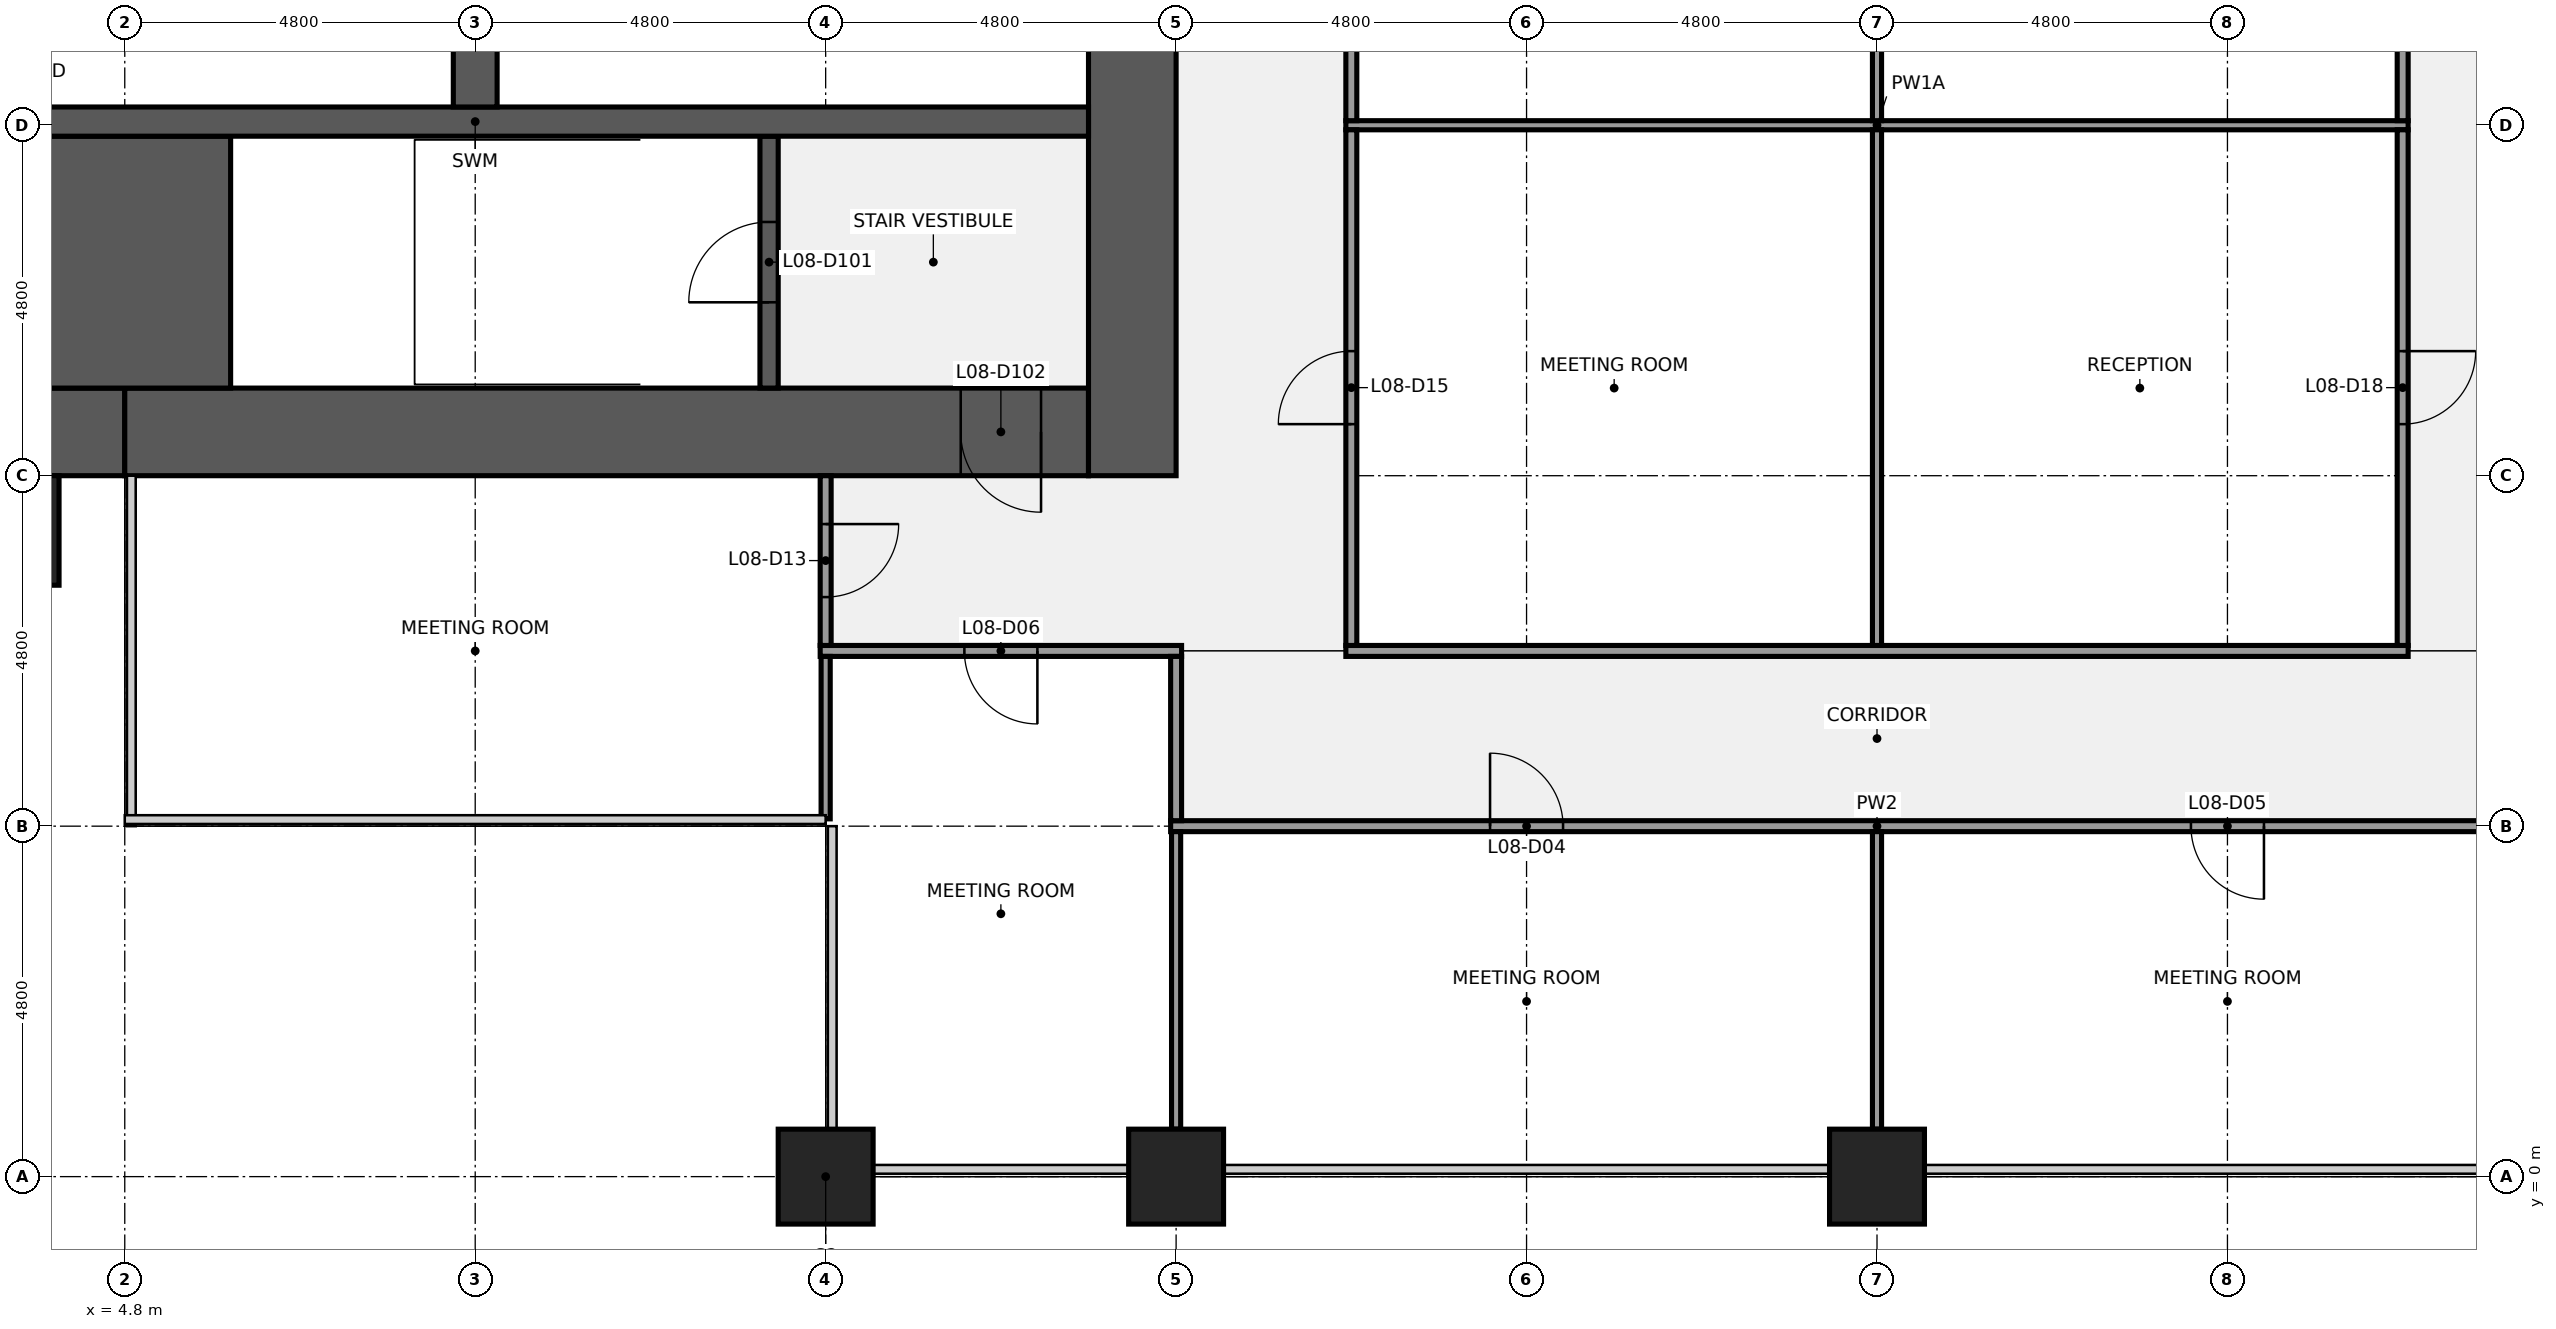
"""IFC4 building model, lengths in metres.
Left out: names, types, materials, properties, quantities, classifications, styles, units other than length and angle.
Written with IfcOpenShell. Run it as: python <this file> out.ifc"""

import sys

from ifc_helpers import new_model, si_unit, direction, frame, frame_2d, origin, origin_2d, place, context, subcontext, project, spatial, rectangle, extrude, element, fill, save


model = new_model("IFC4")
c1 = context("Model", 3, precision=1e-05, world=origin(), true_north=direction((0.0, 1.0)))
c2 = subcontext(c1, "Body", "Model", "MODEL_VIEW")
j1 = project(units=[si_unit("LENGTHUNIT", "METRE"), si_unit("PLANEANGLEUNIT", "RADIAN")], contexts=[c1])
p1 = place(None, origin())
s1 = spatial("IfcSite", under=j1, at=p1, CompositionType="ELEMENT")
p2 = place(p1, origin())
s2 = spatial("IfcBuilding", under=s1, at=p2, CompositionType="ELEMENT")
p3 = place(p2, frame((0.0, 0.0, 43.0)))
s3 = spatial("IfcBuildingStorey", under=s2, at=p3, CompositionType="ELEMENT", Elevation=43.0)
for number, where, z_axis, x_axis in (
    (1, (14.4, 0.0, 0.0), (0.0, 0.0, 1.0), (1.0, 0.0, 0.0)),
    (2, (19.2, 0.0, 0.0), (0.0, 0.0, 1.0), (1.0, 0.0, 0.0)),
    (3, (28.8, 0.0, 0.0), (0.0, 0.0, 1.0), (1.0, 0.0, 0.0)),
):
    element("IfcColumn", number, at=place(p3, frame(where, z_axis=z_axis, x_axis=x_axis)), inside=s3, PredefinedType="COLUMN", context=c2, shape_type="SweptSolid", body=[
        extrude(rectangle(XDim=1.3, YDim=1.3, at=origin_2d()), origin(), (0.0, 0.0, 1.0), 4.0),
    ])
p4 = place(p3, frame((4.8, 10.2, 0.0), z_axis=(0.0, 0.0, 1.0), x_axis=(-1.0, 0.0, 0.0)))
e4 = element("IfcWall", 4, at=p4, inside=s3, PredefinedType="SHEAR", context=c2, shape_type="SweptSolid", body=[
    extrude(rectangle(XDim=3.6, YDim=1.2, at=frame_2d((1.8, 0.0))), origin(), (0.0, 0.0, 1.0), 3.84),
])
p5 = place(p3, frame((18.0, 10.2, 0.0), z_axis=(0.0, 0.0, 1.0), x_axis=(-1.0, 0.0, 0.0)))
e5 = element("IfcWall", 5, at=p5, inside=s3, PredefinedType="SHEAR", context=c2, shape_type="SweptSolid", body=[
    extrude(rectangle(XDim=13.2, YDim=1.2, at=frame_2d((6.6, 0.0))), origin(), (0.0, 0.0, 1.0), 3.84),
])
p6 = place(p5, frame((0.65, 0.0, 0.0)))
e6 = element("IfcOpeningElement", 6, at=p6, cuts=e5, PredefinedType="OPENING", context=c2, shape_type="SweptSolid", body=[
    extrude(rectangle(XDim=1.1, YDim=2.1, at=frame_2d((0.55, 1.05))), frame((0.0, 0.61, 0.0), z_axis=(0.0, -1.0, 0.0), x_axis=(1.0, 0.0, 0.0)), (0.0, 0.0, 1.0), 1.22),
])
p7 = place(p3, frame((18.6, 38.4, 0.0), z_axis=(0.0, 0.0, 1.0), x_axis=(0.0, -1.0, 0.0)))
e7 = element("IfcWall", 7, at=p7, inside=s3, PredefinedType="SHEAR", context=c2, shape_type="SweptSolid", body=[
    extrude(rectangle(XDim=28.8, YDim=1.2, at=frame_2d((14.4, 0.0))), origin(), (0.0, 0.0, 1.0), 3.84),
])
p8 = place(p7, frame((18.3, 0.0, 0.0)))
e8 = element("IfcOpeningElement", 8, at=p8, cuts=e7, PredefinedType="OPENING", context=c2, shape_type="SweptSolid", body=[
    extrude(rectangle(XDim=1.8, YDim=2.1, at=frame_2d((0.9, 1.05))), frame((0.0, 0.61, 0.0), z_axis=(0.0, -1.0, 0.0), x_axis=(1.0, 0.0, 0.0)), (0.0, 0.0, 1.0), 1.22),
])
p9 = place(p7, frame((8.7, 0.0, 0.0)))
e9 = element("IfcOpeningElement", 9, at=p9, cuts=e7, PredefinedType="OPENING", context=c2, shape_type="SweptSolid", body=[
    extrude(rectangle(XDim=1.8, YDim=2.1, at=frame_2d((0.9, 1.05))), frame((0.0, 0.61, 0.0), z_axis=(0.0, -1.0, 0.0), x_axis=(1.0, 0.0, 0.0)), (0.0, 0.0, 1.0), 1.22),
])
p10 = place(p3, frame((1.2, 12.525, 0.0), z_axis=(0.0, 0.0, 1.0), x_axis=(1.0, 0.0, 0.0)))
e10 = element("IfcWall", 10, at=p10, inside=s3, PredefinedType="SHEAR", context=c2, shape_type="SweptSolid", body=[
    extrude(rectangle(XDim=5.05, YDim=3.45, at=frame_2d((2.525, 0.0))), origin(), (0.0, 0.0, 1.0), 3.84),
])
p11 = place(p3, frame((13.625, 10.8, 0.0), z_axis=(0.0, 0.0, 1.0), x_axis=(0.0, 1.0, 0.0)))
e11 = element("IfcWall", 11, at=p11, inside=s3, PredefinedType="SHEAR", context=c2, shape_type="SweptSolid", body=[
    extrude(rectangle(XDim=3.45, YDim=0.25, at=frame_2d((1.725, 0.0))), origin(), (0.0, 0.0, 1.0), 3.84),
])
p12 = place(p11, frame((1.175, 0.0, 0.0)))
e12 = element("IfcOpeningElement", 12, at=p12, cuts=e11, PredefinedType="OPENING", context=c2, shape_type="SweptSolid", body=[
    extrude(rectangle(XDim=1.1, YDim=2.1, at=frame_2d((0.55, 1.05))), frame((0.0, 0.135, 0.0), z_axis=(0.0, -1.0, 0.0), x_axis=(1.0, 0.0, 0.0)), (0.0, 0.0, 1.0), 0.27),
])
p13 = place(p3, frame((1.2, 14.45, 0.0), z_axis=(0.0, 0.0, 1.0), x_axis=(1.0, 0.0, 0.0)))
e13 = element("IfcWall", 13, at=p13, inside=s3, PredefinedType="SHEAR", context=c2, shape_type="SweptSolid", body=[
    extrude(rectangle(XDim=16.8, YDim=0.4, at=frame_2d((8.4, 0.0))), origin(), (0.0, 0.0, 1.0), 3.84),
])
p14 = place(p3, frame((9.6, 14.65, 0.0), z_axis=(0.0, 0.0, 1.0), x_axis=(0.0, 1.0, 0.0)))
e14 = element("IfcWall", 14, at=p14, inside=s3, PredefinedType="SHEAR", context=c2, shape_type="SweptSolid", body=[
    extrude(rectangle(XDim=2.6, YDim=0.6, at=frame_2d((1.3, 0.0))), origin(), (0.0, 0.0, 1.0), 3.84),
])
p15 = place(p3, frame((19.125, 4.8, 0.0), z_axis=(0.0, 0.0, 1.0), x_axis=(1.0, 0.0, 0.0)))
e15 = element("IfcWall", 15, at=p15, inside=s3, PredefinedType="PARTITIONING", context=c2, shape_type="SweptSolid", body=[
    extrude(rectangle(XDim=19.35, YDim=0.15, at=frame_2d((9.675, 0.0))), origin(), (0.0, 0.0, 1.0), 2.849),
])
p16 = place(p15, frame((4.375, 0.0, 0.0)))
e16 = element("IfcOpeningElement", 16, at=p16, cuts=e15, PredefinedType="OPENING", context=c2, shape_type="SweptSolid", body=[
    extrude(rectangle(XDim=1.0, YDim=2.1, at=frame_2d((0.5, 1.05))), frame((0.0, 0.085, 0.0), z_axis=(0.0, -1.0, 0.0), x_axis=(1.0, 0.0, 0.0)), (0.0, 0.0, 1.0), 0.17),
])
p17 = place(p15, frame((13.975, 0.0, 0.0)))
e17 = element("IfcOpeningElement", 17, at=p17, cuts=e15, PredefinedType="OPENING", context=c2, shape_type="SweptSolid", body=[
    extrude(rectangle(XDim=1.0, YDim=2.1, at=frame_2d((0.5, 1.05))), frame((0.0, 0.085, 0.0), z_axis=(0.0, -1.0, 0.0), x_axis=(1.0, 0.0, 0.0)), (0.0, 0.0, 1.0), 0.17),
])
p18 = place(p3, frame((14.325, 7.2, 0.0), z_axis=(0.0, 0.0, 1.0), x_axis=(1.0, 0.0, 0.0)))
e18 = element("IfcWall", 18, at=p18, inside=s3, PredefinedType="PARTITIONING", context=c2, shape_type="SweptSolid", body=[
    extrude(rectangle(XDim=4.95, YDim=0.15, at=frame_2d((2.475, 0.0))), origin(), (0.0, 0.0, 1.0), 2.849),
])
p19 = place(p18, frame((1.975, 0.0, 0.0)))
e19 = element("IfcOpeningElement", 19, at=p19, cuts=e18, PredefinedType="OPENING", context=c2, shape_type="SweptSolid", body=[
    extrude(rectangle(XDim=1.0, YDim=2.1, at=frame_2d((0.5, 1.05))), frame((0.0, 0.085, 0.0), z_axis=(0.0, -1.0, 0.0), x_axis=(1.0, 0.0, 0.0)), (0.0, 0.0, 1.0), 0.17),
])
p20 = place(p3, frame((21.525, 7.2, 0.0), z_axis=(0.0, 0.0, 1.0), x_axis=(1.0, 0.0, 0.0)))
e20 = element("IfcWall", 20, at=p20, inside=s3, PredefinedType="PARTITIONING", context=c2, shape_type="SweptSolid", body=[
    extrude(rectangle(XDim=14.55, YDim=0.15, at=frame_2d((7.275, 0.0))), origin(), (0.0, 0.0, 1.0), 2.849),
])
p21 = place(p3, frame((21.525, 14.4, 0.0), z_axis=(0.0, 0.0, 1.0), x_axis=(1.0, 0.0, 0.0)))
e21 = element("IfcWall", 21, at=p21, inside=s3, PredefinedType="PARTITIONING", context=c2, shape_type="SweptSolid", body=[
    extrude(rectangle(XDim=14.55, YDim=0.125, at=frame_2d((7.275, 0.0))), origin(), (0.0, 0.0, 1.0), 2.849),
])
p22 = place(p3, frame((14.4, 4.9, 0.0), z_axis=(0.0, 0.0, 1.0), x_axis=(0.0, 1.0, 0.0)))
e22 = element("IfcWall", 22, at=p22, inside=s3, PredefinedType="PARTITIONING", context=c2, shape_type="SweptSolid", body=[
    extrude(rectangle(XDim=2.225, YDim=0.125, at=frame_2d((1.113, 0.0))), origin(), (0.0, 0.0, 1.0), 2.849),
])
p23 = place(p3, frame((14.4, 7.275, 0.0), z_axis=(0.0, 0.0, 1.0), x_axis=(0.0, 1.0, 0.0)))
e23 = element("IfcWall", 23, at=p23, inside=s3, PredefinedType="PARTITIONING", context=c2, shape_type="SweptSolid", body=[
    extrude(rectangle(XDim=2.325, YDim=0.15, at=frame_2d((1.163, 0.0))), origin(), (0.0, 0.0, 1.0), 2.849),
])
p24 = place(p23, frame((0.663, 0.0, 0.0)))
e24 = element("IfcOpeningElement", 24, at=p24, cuts=e23, PredefinedType="OPENING", context=c2, shape_type="SweptSolid", body=[
    extrude(rectangle(XDim=1.0, YDim=2.1, at=frame_2d((0.5, 1.05))), frame((0.0, 0.085, 0.0), z_axis=(0.0, -1.0, 0.0), x_axis=(1.0, 0.0, 0.0)), (0.0, 0.0, 1.0), 0.17),
])
p25 = place(p3, frame((19.2, 0.65, 0.0), z_axis=(0.0, 0.0, 1.0), x_axis=(0.0, 1.0, 0.0)))
e25 = element("IfcWall", 25, at=p25, inside=s3, PredefinedType="PARTITIONING", context=c2, shape_type="SweptSolid", body=[
    extrude(rectangle(XDim=4.075, YDim=0.125, at=frame_2d((2.038, 0.0))), origin(), (0.0, 0.0, 1.0), 2.849),
])
p26 = place(p3, frame((19.2, 4.875, 0.0), z_axis=(0.0, 0.0, 1.0), x_axis=(0.0, 1.0, 0.0)))
e26 = element("IfcWall", 26, at=p26, inside=s3, PredefinedType="PARTITIONING", context=c2, shape_type="SweptSolid", body=[
    extrude(rectangle(XDim=2.25, YDim=0.15, at=frame_2d((1.125, 0.0))), origin(), (0.0, 0.0, 1.0), 2.849),
])
p27 = place(p3, frame((21.6, 7.275, 0.0), z_axis=(0.0, 0.0, 1.0), x_axis=(0.0, 1.0, 0.0)))
e27 = element("IfcWall", 27, at=p27, inside=s3, PredefinedType="PARTITIONING", context=c2, shape_type="SweptSolid", body=[
    extrude(rectangle(XDim=7.062, YDim=0.15, at=frame_2d((3.531, 0.0))), origin(), (0.0, 0.0, 1.0), 2.849),
])
p28 = place(p27, frame((3.031, 0.0, 0.0)))
e28 = element("IfcOpeningElement", 28, at=p28, cuts=e27, PredefinedType="OPENING", context=c2, shape_type="SweptSolid", body=[
    extrude(rectangle(XDim=1.0, YDim=2.1, at=frame_2d((0.5, 1.05))), frame((0.0, 0.085, 0.0), z_axis=(0.0, -1.0, 0.0), x_axis=(1.0, 0.0, 0.0)), (0.0, 0.0, 1.0), 0.17),
])
p29 = place(p3, frame((21.6, 14.462, 0.0), z_axis=(0.0, 0.0, 1.0), x_axis=(0.0, 1.0, 0.0)))
e29 = element("IfcWall", 29, at=p29, inside=s3, PredefinedType="PARTITIONING", context=c2, shape_type="SweptSolid", body=[
    extrude(rectangle(XDim=9.475, YDim=0.15, at=frame_2d((4.738, 0.0))), origin(), (0.0, 0.0, 1.0), 2.849),
])
p30 = place(p29, frame((4.238, 0.0, 0.0)))
e30 = element("IfcOpeningElement", 30, at=p30, cuts=e29, PredefinedType="OPENING", context=c2, shape_type="SweptSolid", body=[
    extrude(rectangle(XDim=1.0, YDim=2.1, at=frame_2d((0.5, 1.05))), frame((0.0, 0.085, 0.0), z_axis=(0.0, -1.0, 0.0), x_axis=(1.0, 0.0, 0.0)), (0.0, 0.0, 1.0), 0.17),
])
p31 = place(p3, frame((28.8, 0.65, 0.0), z_axis=(0.0, 0.0, 1.0), x_axis=(0.0, 1.0, 0.0)))
e31 = element("IfcWall", 31, at=p31, inside=s3, PredefinedType="PARTITIONING", context=c2, shape_type="SweptSolid", body=[
    extrude(rectangle(XDim=4.075, YDim=0.125, at=frame_2d((2.038, 0.0))), origin(), (0.0, 0.0, 1.0), 2.849),
])
p32 = place(p3, frame((28.8, 7.275, 0.0), z_axis=(0.0, 0.0, 1.0), x_axis=(0.0, 1.0, 0.0)))
e32 = element("IfcWall", 32, at=p32, inside=s3, PredefinedType="PARTITIONING", context=c2, shape_type="SweptSolid", body=[
    extrude(rectangle(XDim=7.062, YDim=0.125, at=frame_2d((3.531, 0.0))), origin(), (0.0, 0.0, 1.0), 2.849),
])
p33 = place(p3, frame((28.8, 14.462, 0.0), z_axis=(0.0, 0.0, 1.0), x_axis=(0.0, 1.0, 0.0)))
e33 = element("IfcWall", 33, at=p33, inside=s3, PredefinedType="PARTITIONING", context=c2, shape_type="SweptSolid", body=[
    extrude(rectangle(XDim=9.475, YDim=0.125, at=frame_2d((4.738, 0.0))), origin(), (0.0, 0.0, 1.0), 2.849),
])
p34 = place(p3, frame((36.0, 7.275, 0.0), z_axis=(0.0, 0.0, 1.0), x_axis=(0.0, 1.0, 0.0)))
e34 = element("IfcWall", 34, at=p34, inside=s3, PredefinedType="PARTITIONING", context=c2, shape_type="SweptSolid", body=[
    extrude(rectangle(XDim=7.062, YDim=0.15, at=frame_2d((3.531, 0.0))), origin(), (0.0, 0.0, 1.0), 2.849),
])
p35 = place(p34, frame((3.031, 0.0, 0.0)))
e35 = element("IfcOpeningElement", 35, at=p35, cuts=e34, PredefinedType="OPENING", context=c2, shape_type="SweptSolid", body=[
    extrude(rectangle(XDim=1.0, YDim=2.1, at=frame_2d((0.5, 1.05))), frame((0.0, 0.085, 0.0), z_axis=(0.0, -1.0, 0.0), x_axis=(1.0, 0.0, 0.0)), (0.0, 0.0, 1.0), 0.17),
])
p36 = place(p3, frame((36.0, 14.462, 0.0), z_axis=(0.0, 0.0, 1.0), x_axis=(0.0, 1.0, 0.0)))
e36 = element("IfcWall", 36, at=p36, inside=s3, PredefinedType="PARTITIONING", context=c2, shape_type="SweptSolid", body=[
    extrude(rectangle(XDim=9.475, YDim=0.15, at=frame_2d((4.738, 0.0))), origin(), (0.0, 0.0, 1.0), 2.849),
])
p37 = place(p36, frame((4.238, 0.0, 0.0)))
e37 = element("IfcOpeningElement", 37, at=p37, cuts=e36, PredefinedType="OPENING", context=c2, shape_type="SweptSolid", body=[
    extrude(rectangle(XDim=1.0, YDim=2.1, at=frame_2d((0.5, 1.05))), frame((0.0, 0.085, 0.0), z_axis=(0.0, -1.0, 0.0), x_axis=(1.0, 0.0, 0.0)), (0.0, 0.0, 1.0), 0.17),
])
p38 = place(p3, frame((2.4, 8.85, 0.0), z_axis=(0.0, 0.0, 1.0), x_axis=(1.0, 0.0, 0.0)))
e38 = element("IfcColumn", 38, at=p38, inside=s3, PredefinedType="PILASTER", context=c2, shape_type="SweptSolid", body=[
    extrude(rectangle(XDim=3.0, YDim=1.5, at=origin_2d()), origin(), (0.0, 0.0, 1.0), 4.0),
])
for number, where, z_axis, x_axis in (
    (39, (14.4, -1.075, 0.0), (0.0, 0.0, 1.0), (1.0, 0.0, 0.0)),
    (40, (19.2, -1.075, 0.0), (0.0, 0.0, 1.0), (1.0, 0.0, 0.0)),
    (41, (38.4, -1.075, 0.0), (0.0, 0.0, 1.0), (1.0, 0.0, 0.0)),
):
    element("IfcColumn", number, at=place(p3, frame(where, z_axis=z_axis, x_axis=x_axis)), inside=s3, PredefinedType="PILASTER", context=c2, shape_type="SweptSolid", body=[
        extrude(rectangle(XDim=4.2, YDim=0.85, at=origin_2d()), origin(), (0.0, 0.0, 1.0), 4.0),
    ])
p39 = place(p12, origin())
e42 = element("IfcDoor", 42, at=p39, inside=s3, OperationType="SINGLE_SWING_LEFT", PredefinedType="DOOR", context=c2, shape_type="SweptSolid", body=[
    extrude(rectangle(XDim=1.1, YDim=2.1, at=frame_2d((0.55, 1.05))), frame((0.0, 0.025, 0.0), z_axis=(0.0, -1.0, 0.0), x_axis=(1.0, 0.0, 0.0)), (0.0, 0.0, 1.0), 0.05),
])
fill(e12, e42)
p40 = place(p6, origin())
e43 = element("IfcDoor", 43, at=p40, inside=s3, OperationType="SINGLE_SWING_LEFT", PredefinedType="DOOR", context=c2, shape_type="SweptSolid", body=[
    extrude(rectangle(XDim=1.1, YDim=2.1, at=frame_2d((0.55, 1.05))), frame((0.0, 0.025, 0.0), z_axis=(0.0, -1.0, 0.0), x_axis=(1.0, 0.0, 0.0)), (0.0, 0.0, 1.0), 0.05),
])
fill(e6, e43)
p41 = place(p16, origin())
e44 = element("IfcDoor", 44, at=p41, inside=s3, OperationType="SINGLE_SWING_LEFT", PredefinedType="DOOR", context=c2, shape_type="SweptSolid", body=[
    extrude(rectangle(XDim=1.0, YDim=2.1, at=frame_2d((0.5, 1.05))), frame((0.0, 0.025, 0.0), z_axis=(0.0, -1.0, 0.0), x_axis=(1.0, 0.0, 0.0)), (0.0, 0.0, 1.0), 0.05),
])
fill(e16, e44)
p42 = place(p17, origin())
e45 = element("IfcDoor", 45, at=p42, inside=s3, OperationType="SINGLE_SWING_RIGHT", PredefinedType="DOOR", context=c2, shape_type="SweptSolid", body=[
    extrude(rectangle(XDim=1.0, YDim=2.1, at=frame_2d((0.5, 1.05))), frame((0.0, 0.025, 0.0), z_axis=(0.0, -1.0, 0.0), x_axis=(1.0, 0.0, 0.0)), (0.0, 0.0, 1.0), 0.05),
])
fill(e17, e45)
p43 = place(p19, origin())
e46 = element("IfcDoor", 46, at=p43, inside=s3, OperationType="SINGLE_SWING_RIGHT", PredefinedType="DOOR", context=c2, shape_type="SweptSolid", body=[
    extrude(rectangle(XDim=1.0, YDim=2.1, at=frame_2d((0.5, 1.05))), frame((0.0, 0.025, 0.0), z_axis=(0.0, -1.0, 0.0), x_axis=(1.0, 0.0, 0.0)), (0.0, 0.0, 1.0), 0.05),
])
fill(e19, e46)
p44 = place(p24, origin())
e47 = element("IfcDoor", 47, at=p44, inside=s3, OperationType="SINGLE_SWING_RIGHT", PredefinedType="DOOR", context=c2, shape_type="SweptSolid", body=[
    extrude(rectangle(XDim=1.0, YDim=2.1, at=frame_2d((0.5, 1.05))), frame((0.0, 0.025, 0.0), z_axis=(0.0, -1.0, 0.0), x_axis=(1.0, 0.0, 0.0)), (0.0, 0.0, 1.0), 0.05),
])
fill(e24, e47)
p45 = place(p28, origin())
e48 = element("IfcDoor", 48, at=p45, inside=s3, OperationType="SINGLE_SWING_LEFT", PredefinedType="DOOR", context=c2, shape_type="SweptSolid", body=[
    extrude(rectangle(XDim=1.0, YDim=2.1, at=frame_2d((0.5, 1.05))), frame((0.0, 0.025, 0.0), z_axis=(0.0, -1.0, 0.0), x_axis=(1.0, 0.0, 0.0)), (0.0, 0.0, 1.0), 0.05),
])
fill(e28, e48)
p46 = place(p35, origin())
e49 = element("IfcDoor", 49, at=p46, inside=s3, OperationType="SINGLE_SWING_RIGHT", PredefinedType="DOOR", context=c2, shape_type="SweptSolid", body=[
    extrude(rectangle(XDim=1.0, YDim=2.1, at=frame_2d((0.5, 1.05))), frame((0.0, 0.025, 0.0), z_axis=(0.0, -1.0, 0.0), x_axis=(1.0, 0.0, 0.0)), (0.0, 0.0, 1.0), 0.05),
])
fill(e35, e49)
save(model, sys.argv[1])
